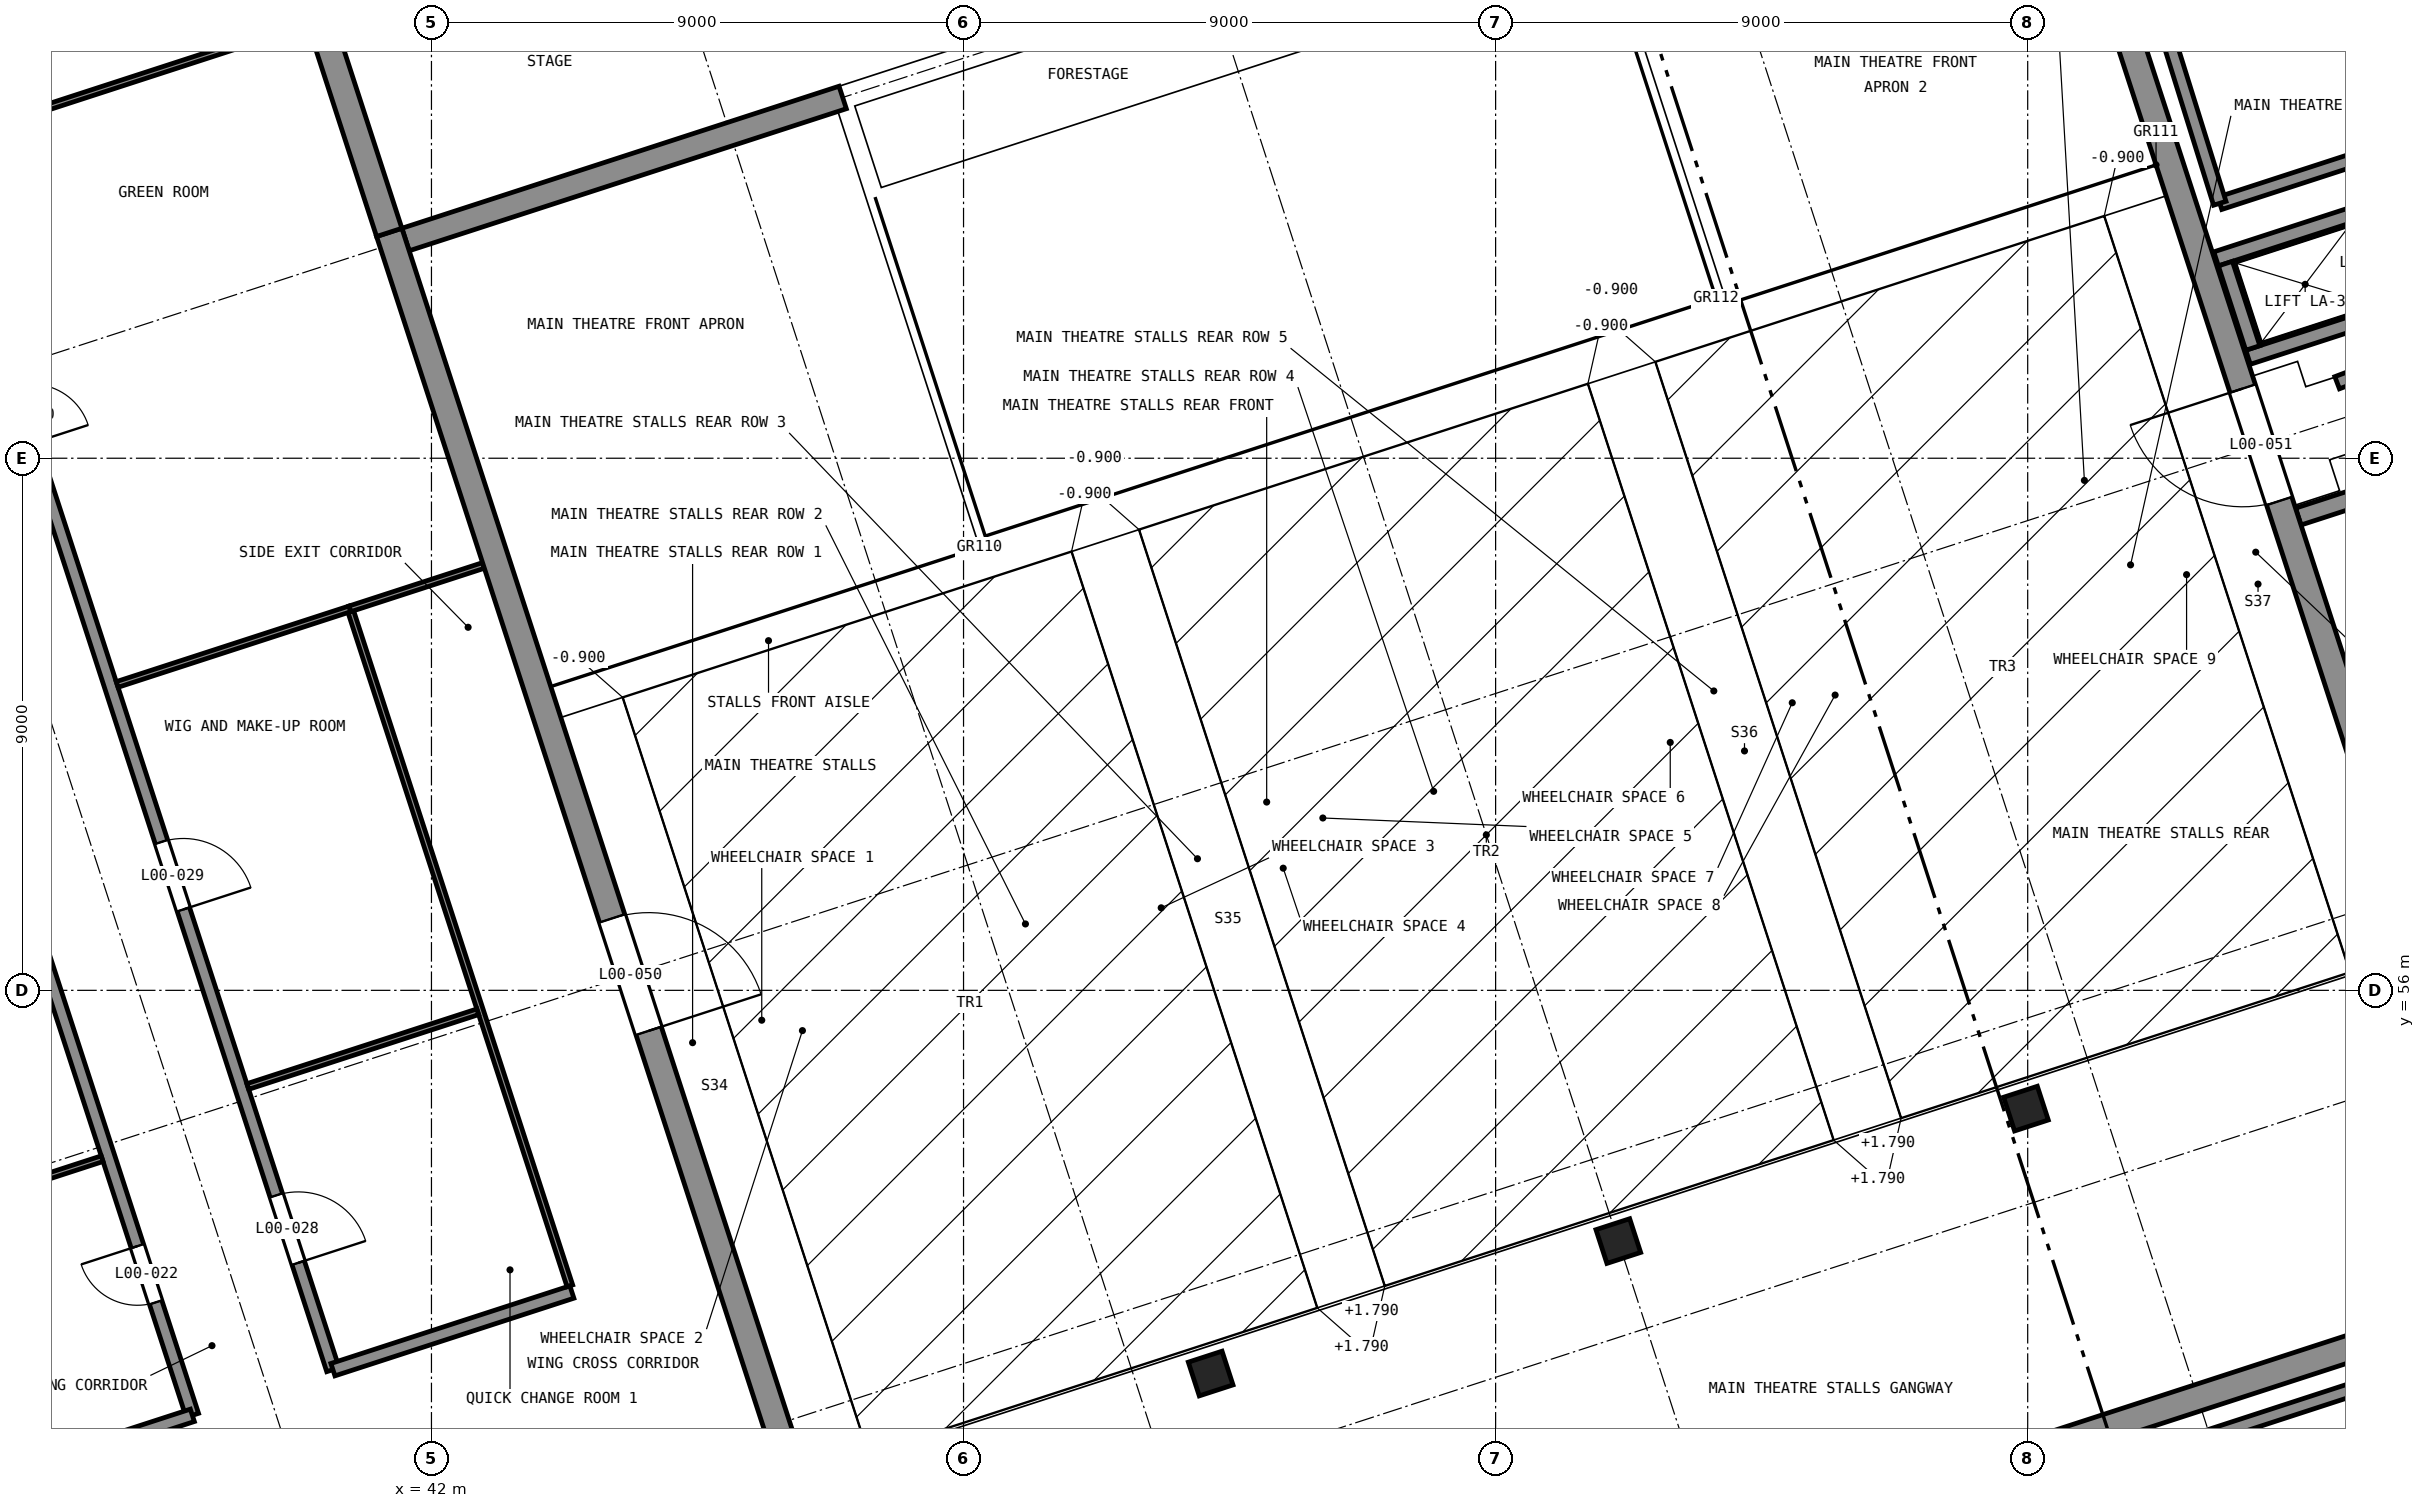
"""IFC4 building model, lengths in metres.
Left out: names, types, materials, properties, quantities, classifications, styles, units other than length and angle.
Written with IfcOpenShell. Run it as: python <this file> out.ifc"""

import sys

from ifc_helpers import new_model, si_unit, direction, frame, frame_2d, origin, origin_2d, place, context, subcontext, project, spatial, rectangle, extrude, element, fill, save


model = new_model("IFC4")
c1 = context("Model", 3, precision=1e-05, world=origin(), true_north=direction((0.0, 1.0)))
c2 = subcontext(c1, "Body", "Model", "MODEL_VIEW")
j1 = project(units=[si_unit("LENGTHUNIT", "METRE"), si_unit("PLANEANGLEUNIT", "RADIAN")], contexts=[c1])
p1 = place(None, origin())
s1 = spatial("IfcSite", under=j1, at=p1, CompositionType="ELEMENT")
p2 = place(p1, origin())
s2 = spatial("IfcBuilding", under=s1, at=p2, CompositionType="ELEMENT")
p3 = place(p2, origin())
s3 = spatial("IfcBuildingStorey", under=s2, at=p3, CompositionType="ELEMENT", Elevation=0.0)
p4 = place(p3, frame((49.786, 41.93, 0.0), z_axis=(0.0, 0.0, 1.0), x_axis=(0.951055937194, 0.309018776661, 0.0)))
e1 = element("IfcWall", 1, at=p4, inside=s3, PredefinedType="SHEAR", context=c2, shape_type="SweptSolid", body=[
    extrude(rectangle(XDim=29.45, YDim=0.45, at=frame_2d((14.725, 0.0))), origin(), (0.0, 0.0, 1.0), 5.5),
])
p5 = place(p3, frame((49.93, 42.214, 0.0), z_axis=(0.0, 0.0, 1.0), x_axis=(-0.309016215614, 0.95105676933, 0.0)))
e2 = element("IfcWall", 2, at=p5, inside=s3, PredefinedType="SHEAR", context=c2, shape_type="SweptSolid", body=[
    extrude(rectangle(XDim=27.975, YDim=0.45, at=frame_2d((13.988, 0.0))), origin(), (0.0, 0.0, 1.0), 5.5),
])
p6 = place(p5, frame((13.775, 0.0, 0.0)))
e3 = element("IfcOpeningElement", 3, at=p6, cuts=e2, PredefinedType="OPENING", context=c2, shape_type="SweptSolid", body=[
    extrude(rectangle(XDim=2.0, YDim=2.4, at=frame_2d((1.0, 1.2))), frame((0.0, 0.235, 0.0), z_axis=(0.0, -1.0, 0.0), x_axis=(1.0, 0.0, 0.0)), (0.0, 0.0, 1.0), 0.47),
])
p7 = place(p3, frame((77.511, 51.176, 0.0), z_axis=(0.0, 0.0, 1.0), x_axis=(-0.309018780445, 0.951055935964, 0.0)))
e4 = element("IfcWall", 4, at=p7, inside=s3, PredefinedType="SHEAR", context=c2, shape_type="SweptSolid", body=[
    extrude(rectangle(XDim=27.975, YDim=0.45, at=frame_2d((13.987, 0.0))), origin(), (0.0, 0.0, 1.0), 5.5),
])
p8 = place(p7, frame((13.775, 0.0, 0.0)))
e5 = element("IfcOpeningElement", 5, at=p8, cuts=e4, PredefinedType="OPENING", context=c2, shape_type="SweptSolid", body=[
    extrude(rectangle(XDim=2.0, YDim=2.4, at=frame_2d((1.0, 1.2))), frame((0.0, 0.235, 0.0), z_axis=(0.0, -1.0, 0.0), x_axis=(1.0, 0.0, 0.0)), (0.0, 0.0, 1.0), 0.47),
])
p9 = place(p3, frame((41.286, 68.82, 0.0), z_axis=(0.0, 0.0, 1.0), x_axis=(-0.309008517326, 0.951059270613, 0.0)))
e6 = element("IfcWall", 6, at=p9, inside=s3, PredefinedType="SHEAR", context=c2, shape_type="SweptSolid", body=[
    extrude(rectangle(XDim=19.575, YDim=0.45, at=frame_2d((9.788, 0.0))), origin(), (0.0, 0.0, 1.0), 5.5),
])
p10 = place(p9, frame((7.4, 0.0, 0.0)))
e7 = element("IfcOpeningElement", 7, at=p10, cuts=e6, PredefinedType="OPENING", context=c2, shape_type="SweptSolid", body=[
    extrude(rectangle(XDim=4.8, YDim=4.5, at=frame_2d((2.4, 2.25))), frame((0.0, 0.235, 0.0), z_axis=(0.0, -1.0, 0.0), x_axis=(1.0, 0.0, 0.0)), (0.0, 0.0, 1.0), 0.47),
])
p11 = place(p3, frame((41.562, 68.699, 0.0), z_axis=(0.0, 0.0, 1.0), x_axis=(0.95105806443, 0.309012229664, 0.0)))
e8 = element("IfcWall", 8, at=p11, inside=s3, PredefinedType="SHEAR", context=c2, shape_type="SweptSolid", body=[
    extrude(rectangle(XDim=7.775, YDim=0.4, at=frame_2d((3.888, 0.0))), origin(), (0.0, 0.0, 1.0), 5.5),
])
p12 = place(p3, frame((80.305, 66.199, 0.0), z_axis=(0.0, 0.0, 1.0), x_axis=(-0.951054354327, -0.309023648149, 0.0)))
e9 = element("IfcWall", 9, at=p12, inside=s3, PredefinedType="SOLIDWALL", context=c2, shape_type="SweptSolid", body=[
    extrude(rectangle(XDim=7.075, YDim=0.3, at=frame_2d((3.537, 0.0))), origin(), (0.0, 0.0, 1.0), 5.2),
])
for number, where, z_axis, x_axis in (
    (10, (72.727, 66.708, -1.5), (0.0, 0.0, 1.0), (0.951, 0.309, 0.0)),
    (11, (74.659, 69.175, -1.5), (0.0, 0.0, 1.0), (-0.951, -0.309, 0.0)),
):
    element("IfcWall", number, at=place(p3, frame(where, z_axis=z_axis, x_axis=x_axis)), inside=s3, PredefinedType="SHEAR", context=c2, shape_type="SweptSolid", body=[
        extrude(rectangle(XDim=2.6, YDim=0.25, at=frame_2d((1.3, 0.0))), origin(), (0.0, 0.0, 1.0), 7.0),
    ])
p13 = place(p3, frame((72.344, 68.292, -1.5), z_axis=(0.0, 0.0, 1.0), x_axis=(0.309089752708, -0.951032872603, 0.0)))
e12 = element("IfcWall", 12, at=p13, inside=s3, PredefinedType="SHEAR", context=c2, shape_type="SweptSolid", body=[
    extrude(rectangle(XDim=1.5, YDim=0.25, at=frame_2d((0.75, 0.0))), origin(), (0.0, 0.0, 1.0), 7.0),
])
for number, where, z_axis, x_axis in (
    (13, (55.18, 49.519, 0.0), (0.0, 0.0, 1.0), (0.951, 0.309, 0.0)),
    (14, (62.075, 51.759, 0.0), (0.0, 0.0, 1.0), (0.951, 0.309, 0.0)),
    (15, (68.97, 54.0, 0.0), (0.0, 0.0, 1.0), (0.951, 0.309, 0.0)),
):
    element("IfcColumn", number, at=place(p3, frame(where, z_axis=z_axis, x_axis=x_axis)), inside=s3, PredefinedType="COLUMN", context=c2, shape_type="SweptSolid", body=[
        extrude(rectangle(XDim=0.6, YDim=0.6, at=origin_2d()), origin(), (0.0, 0.0, 1.0), 0.55),
    ])
p14 = place(p3, frame((74.234, 66.277, 0.0), z_axis=(0.0, 0.0, 1.0), x_axis=(0.934839656158, 0.355070158243, 0.0)))
e16 = element("IfcWall", 16, at=p14, inside=s3, PredefinedType="SOLIDWALL", context=c2, shape_type="SweptSolid", body=[
    extrude(rectangle(XDim=2.052, YDim=0.22, at=frame_2d((1.026, 0.0))), origin(), (0.0, 0.0, 1.0), 5.2),
])
p15 = place(p3, frame((75.007, 70.208, 0.0), z_axis=(0.0, 0.0, 1.0), x_axis=(-0.951047059821, -0.309046096893, 0.0)))
e17 = element("IfcWall", 17, at=p15, inside=s3, PredefinedType="SOLIDWALL", context=c2, shape_type="SweptSolid", body=[
    extrude(rectangle(XDim=2.9, YDim=0.22, at=frame_2d((1.45, 0.0))), origin(), (0.0, 0.0, 1.0), 5.2),
])
p16 = place(p3, frame((72.249, 69.312, 0.0), z_axis=(0.0, 0.0, 1.0), x_axis=(-0.297531334915, 0.954712053314, 0.0)))
e18 = element("IfcWall", 18, at=p16, inside=s3, PredefinedType="SOLIDWALL", context=c2, shape_type="SweptSolid", body=[
    extrude(rectangle(XDim=8.301, YDim=0.22, at=frame_2d((4.15, 0.0))), origin(), (0.0, 0.0, 1.0), 5.2),
])
p17 = place(p3, frame((64.081, 45.859, 0.0), z_axis=(0.0, 0.0, 1.0), x_axis=(0.950848496094, 0.309656483019, 0.0)))
e19 = element("IfcWall", 19, at=p17, inside=s3, PredefinedType="SOLIDWALL", context=c2, shape_type="SweptSolid", body=[
    extrude(rectangle(XDim=15.086, YDim=0.22, at=frame_2d((7.543, 0.0))), origin(), (0.0, 0.0, 1.0), 5.2),
])
p18 = place(p3, frame((37.956, 48.812, 0.0), z_axis=(0.0, 0.0, 1.0), x_axis=(-0.30901736393, 0.951056396219, 0.0)))
e20 = element("IfcWall", 20, at=p18, inside=s3, PredefinedType="SOLIDWALL", context=c2, shape_type="SweptSolid", body=[
    extrude(rectangle(XDim=41.7, YDim=0.22, at=frame_2d((20.85, 0.0))), origin(), (0.0, 0.0, 1.0), 5.2),
])
p19 = place(p18, frame((2.009, 0.0, 0.0)))
e21 = element("IfcOpeningElement", 21, at=p19, cuts=e20, PredefinedType="OPENING", context=c2, shape_type="SweptSolid", body=[
    extrude(rectangle(XDim=1.0, YDim=2.1, at=frame_2d((0.5, 1.05))), frame((0.0, 0.12, 0.0), z_axis=(0.0, -1.0, 0.0), x_axis=(1.0, 0.0, 0.0)), (0.0, 0.0, 1.0), 0.24),
])
p20 = place(p18, frame((11.495, 0.0, 0.0)))
e22 = element("IfcOpeningElement", 22, at=p20, cuts=e20, PredefinedType="OPENING", context=c2, shape_type="SweptSolid", body=[
    extrude(rectangle(XDim=1.0, YDim=2.1, at=frame_2d((0.5, 1.05))), frame((0.0, 0.12, 0.0), z_axis=(0.0, -1.0, 0.0), x_axis=(1.0, 0.0, 0.0)), (0.0, 0.0, 1.0), 0.24),
])
p21 = place(p18, frame((21.7, 0.0, 0.0)))
e23 = element("IfcOpeningElement", 23, at=p21, cuts=e20, PredefinedType="OPENING", context=c2, shape_type="SweptSolid", body=[
    extrude(rectangle(XDim=1.2, YDim=2.1, at=frame_2d((0.6, 1.05))), frame((0.0, 0.12, 0.0), z_axis=(0.0, -1.0, 0.0), x_axis=(1.0, 0.0, 0.0)), (0.0, 0.0, 1.0), 0.24),
])
p22 = place(p18, frame((26.7, 0.0, 0.0)))
e24 = element("IfcOpeningElement", 24, at=p22, cuts=e20, PredefinedType="OPENING", context=c2, shape_type="SweptSolid", body=[
    extrude(rectangle(XDim=1.2, YDim=2.1, at=frame_2d((0.6, 1.05))), frame((0.0, 0.12, 0.0), z_axis=(0.0, -1.0, 0.0), x_axis=(1.0, 0.0, 0.0)), (0.0, 0.0, 1.0), 0.24),
])
p23 = place(p18, frame((31.739, 0.0, 0.0)))
e25 = element("IfcOpeningElement", 25, at=p23, cuts=e20, PredefinedType="OPENING", context=c2, shape_type="SweptSolid", body=[
    extrude(rectangle(XDim=1.2, YDim=2.1, at=frame_2d((0.6, 1.05))), frame((0.0, 0.12, 0.0), z_axis=(0.0, -1.0, 0.0), x_axis=(1.0, 0.0, 0.0)), (0.0, 0.0, 1.0), 0.24),
])
p24 = place(p3, frame((40.333, 49.584, 0.0), z_axis=(0.0, 0.0, 1.0), x_axis=(-0.309015643281, 0.951056955291, 0.0)))
e26 = element("IfcWall", 26, at=p24, inside=s3, PredefinedType="SOLIDWALL", context=c2, shape_type="SweptSolid", body=[
    extrude(rectangle(XDim=41.7, YDim=0.22, at=frame_2d((20.85, 0.0))), origin(), (0.0, 0.0, 1.0), 5.2),
])
p25 = place(p24, frame((1.9, 0.0, 0.0)))
e27 = element("IfcOpeningElement", 27, at=p25, cuts=e26, PredefinedType="OPENING", context=c2, shape_type="SweptSolid", body=[
    extrude(rectangle(XDim=1.2, YDim=2.1, at=frame_2d((0.6, 1.05))), frame((0.0, 0.12, 0.0), z_axis=(0.0, -1.0, 0.0), x_axis=(1.0, 0.0, 0.0)), (0.0, 0.0, 1.0), 0.24),
])
p26 = place(p24, frame((8.185, 0.0, 0.0)))
e28 = element("IfcOpeningElement", 28, at=p26, cuts=e26, PredefinedType="OPENING", context=c2, shape_type="SweptSolid", body=[
    extrude(rectangle(XDim=1.2, YDim=2.1, at=frame_2d((0.6, 1.05))), frame((0.0, 0.12, 0.0), z_axis=(0.0, -1.0, 0.0), x_axis=(1.0, 0.0, 0.0)), (0.0, 0.0, 1.0), 0.24),
])
p27 = place(p24, frame((16.475, 0.0, 0.0)))
e29 = element("IfcOpeningElement", 29, at=p27, cuts=e26, PredefinedType="OPENING", context=c2, shape_type="SweptSolid", body=[
    extrude(rectangle(XDim=1.0, YDim=2.1, at=frame_2d((0.5, 1.05))), frame((0.0, 0.12, 0.0), z_axis=(0.0, -1.0, 0.0), x_axis=(1.0, 0.0, 0.0)), (0.0, 0.0, 1.0), 0.24),
])
p28 = place(p24, frame((23.05, 0.0, 0.0)))
e30 = element("IfcOpeningElement", 30, at=p28, cuts=e26, PredefinedType="OPENING", context=c2, shape_type="SweptSolid", body=[
    extrude(rectangle(XDim=1.0, YDim=2.1, at=frame_2d((0.5, 1.05))), frame((0.0, 0.12, 0.0), z_axis=(0.0, -1.0, 0.0), x_axis=(1.0, 0.0, 0.0)), (0.0, 0.0, 1.0), 0.24),
])
p29 = place(p24, frame((27.3, 0.0, 0.0)))
e31 = element("IfcOpeningElement", 31, at=p29, cuts=e26, PredefinedType="OPENING", context=c2, shape_type="SweptSolid", body=[
    extrude(rectangle(XDim=1.0, YDim=2.1, at=frame_2d((0.5, 1.05))), frame((0.0, 0.12, 0.0), z_axis=(0.0, -1.0, 0.0), x_axis=(1.0, 0.0, 0.0)), (0.0, 0.0, 1.0), 0.24),
])
p30 = place(p24, frame((32.761, 0.0, 0.0)))
e32 = element("IfcOpeningElement", 32, at=p30, cuts=e26, PredefinedType="OPENING", context=c2, shape_type="SweptSolid", body=[
    extrude(rectangle(XDim=1.0, YDim=2.1, at=frame_2d((0.5, 1.05))), frame((0.0, 0.12, 0.0), z_axis=(0.0, -1.0, 0.0), x_axis=(1.0, 0.0, 0.0)), (0.0, 0.0, 1.0), 0.24),
])
p31 = place(p3, frame((34.817, 47.792, 0.0), z_axis=(0.0, 0.0, 1.0), x_axis=(0.951053095941, 0.309027520945, 0.0)))
e33 = element("IfcWall", 33, at=p31, inside=s3, PredefinedType="SOLIDWALL", context=c2, shape_type="SweptSolid", body=[
    extrude(rectangle(XDim=3.3, YDim=0.22, at=frame_2d((1.65, 0.0))), origin(), (0.0, 0.0, 1.0), 5.2),
])
p32 = place(p3, frame((40.333, 49.584, 0.0), z_axis=(0.0, 0.0, 1.0), x_axis=(0.951062770994, 0.308997743729, 0.0)))
e34 = element("IfcWall", 34, at=p32, inside=s3, PredefinedType="SOLIDWALL", context=c2, shape_type="SweptSolid", body=[
    extrude(rectangle(XDim=4.25, YDim=0.22, at=frame_2d((2.125, 0.0))), origin(), (0.0, 0.0, 1.0), 5.2),
])
p33 = place(p3, frame((33.396, 52.167, 0.0), z_axis=(0.0, 0.0, 1.0), x_axis=(0.951044192343, 0.309054921027, 0.0)))
e35 = element("IfcWall", 35, at=p33, inside=s3, PredefinedType="PARTITIONING", context=c2, shape_type="SweptSolid", body=[
    extrude(rectangle(XDim=3.19, YDim=0.1, at=frame_2d((1.595, 0.0))), origin(), (0.0, 0.0, 1.0), 5.2),
])
p34 = place(p3, frame((38.893, 54.373, 0.0), z_axis=(0.0, 0.0, 1.0), x_axis=(0.951055560564, 0.309019935796, 0.0)))
e36 = element("IfcWall", 36, at=p34, inside=s3, PredefinedType="PARTITIONING", context=c2, shape_type="SweptSolid", body=[
    extrude(rectangle(XDim=4.09, YDim=0.1, at=frame_2d((2.045, 0.0))), origin(), (0.0, 0.0, 1.0), 5.2),
])
p35 = place(p3, frame((36.683, 61.173, 0.0), z_axis=(0.0, 0.0, 1.0), x_axis=(0.95105616864, 0.309018064344, 0.0)))
e37 = element("IfcWall", 37, at=p35, inside=s3, PredefinedType="PARTITIONING", context=c2, shape_type="SweptSolid", body=[
    extrude(rectangle(XDim=4.14, YDim=0.1, at=frame_2d((2.07, 0.0))), origin(), (0.0, 0.0, 1.0), 5.2),
])
p36 = place(p3, frame((40.621, 62.453, 0.0), z_axis=(0.0, 0.0, 1.0), x_axis=(0.951061260164, 0.309002393867, 0.0)))
e38 = element("IfcWall", 38, at=p36, inside=s3, PredefinedType="PARTITIONING", context=c2, shape_type="SweptSolid", body=[
    extrude(rectangle(XDim=2.375, YDim=0.1, at=frame_2d((1.188, 0.0))), origin(), (0.0, 0.0, 1.0), 5.2),
])
p37 = place(p3, frame((33.701, 70.351, 0.0), z_axis=(0.0, 0.0, 1.0), x_axis=(0.951058024796, 0.309012351648, 0.0)))
e39 = element("IfcWall", 39, at=p37, inside=s3, PredefinedType="PARTITIONING", context=c2, shape_type="SweptSolid", body=[
    extrude(rectangle(XDim=6.515, YDim=0.1, at=frame_2d((3.257, 0.0))), origin(), (0.0, 0.0, 1.0), 5.2),
])
p38 = place(p3, frame((44.341, 51.002, 0.0), z_axis=(0.0, 0.0, 1.0), x_axis=(-0.309016547708, 0.951056661426, 0.0)))
e40 = element("IfcWall", 40, at=p38, inside=s3, PredefinedType="PARTITIONING", context=c2, shape_type="SweptSolid", body=[
    extrude(rectangle(XDim=11.99, YDim=0.1, at=frame_2d((5.995, 0.0))), origin(), (0.0, 0.0, 1.0), 5.2),
])
p39 = place(p19, origin())
e41 = element("IfcDoor", 41, at=p39, inside=s3, OperationType="SINGLE_SWING_LEFT", PredefinedType="DOOR", context=c2, shape_type="SweptSolid", body=[
    extrude(rectangle(XDim=1.0, YDim=2.1, at=frame_2d((0.5, 1.05))), frame((0.0, 0.025, 0.0), z_axis=(0.0, -1.0, 0.0), x_axis=(1.0, 0.0, 0.0)), (0.0, 0.0, 1.0), 0.05),
])
fill(e21, e41)
p40 = place(p25, frame((1.2, 0.0, 0.0), z_axis=(0.0, 0.0, 1.0), x_axis=(-1.0, 0.0, 0.0)))
e42 = element("IfcDoor", 42, at=p40, inside=s3, OperationType="SINGLE_SWING_LEFT", PredefinedType="DOOR", context=c2, shape_type="SweptSolid", body=[
    extrude(rectangle(XDim=1.2, YDim=2.1, at=frame_2d((0.6, 1.05))), frame((0.0, 0.025, 0.0), z_axis=(0.0, -1.0, 0.0), x_axis=(1.0, 0.0, 0.0)), (0.0, 0.0, 1.0), 0.05),
])
fill(e27, e42)
p41 = place(p26, frame((1.2, 0.0, 0.0), z_axis=(0.0, 0.0, 1.0), x_axis=(-1.0, 0.0, 0.0)))
e43 = element("IfcDoor", 43, at=p41, inside=s3, OperationType="SINGLE_SWING_LEFT", PredefinedType="DOOR", context=c2, shape_type="SweptSolid", body=[
    extrude(rectangle(XDim=1.2, YDim=2.1, at=frame_2d((0.6, 1.05))), frame((0.0, 0.025, 0.0), z_axis=(0.0, -1.0, 0.0), x_axis=(1.0, 0.0, 0.0)), (0.0, 0.0, 1.0), 0.05),
])
fill(e28, e43)
p42 = place(p6, frame((2.0, 0.0, 0.0), z_axis=(0.0, 0.0, 1.0), x_axis=(-1.0, 0.0, 0.0)))
e44 = element("IfcDoor", 44, at=p42, inside=s3, OperationType="DOUBLE_DOOR_SINGLE_SWING", PredefinedType="DOOR", context=c2, shape_type="SweptSolid", body=[
    extrude(rectangle(XDim=2.0, YDim=2.4, at=frame_2d((1.0, 1.2))), frame((0.0, 0.025, 0.0), z_axis=(0.0, -1.0, 0.0), x_axis=(1.0, 0.0, 0.0)), (0.0, 0.0, 1.0), 0.05),
])
fill(e3, e44)
p43 = place(p8, origin())
e45 = element("IfcDoor", 45, at=p43, inside=s3, OperationType="DOUBLE_DOOR_SINGLE_SWING", PredefinedType="DOOR", context=c2, shape_type="SweptSolid", body=[
    extrude(rectangle(XDim=2.0, YDim=2.4, at=frame_2d((1.0, 1.2))), frame((0.0, 0.025, 0.0), z_axis=(0.0, -1.0, 0.0), x_axis=(1.0, 0.0, 0.0)), (0.0, 0.0, 1.0), 0.05),
])
fill(e5, e45)
save(model, sys.argv[1])
